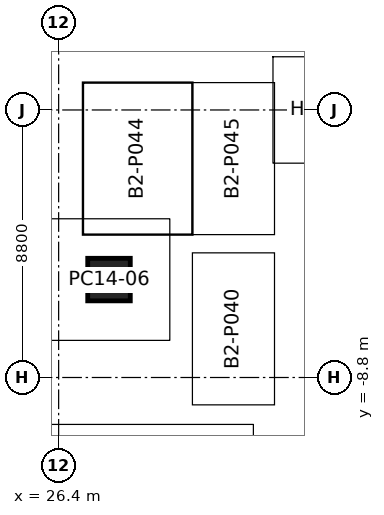
"""IFC4 building model, lengths in metres.
Left out: names, types, materials, properties, quantities, classifications, styles, units other than length and angle.
Written with IfcOpenShell. Run it as: python <this file> out.ifc"""

import sys

from ifc_helpers import new_model, si_unit, direction, frame, origin, origin_2d, place, context, subcontext, project, spatial, rectangle, extrude, element, save


model = new_model("IFC4")
c1 = context("Model", 3, precision=1e-05, world=origin(), true_north=direction((0.0, 1.0)))
c2 = subcontext(c1, "Body", "Model", "MODEL_VIEW")
j1 = project(units=[si_unit("LENGTHUNIT", "METRE"), si_unit("PLANEANGLEUNIT", "RADIAN")], contexts=[c1])
p1 = place(None, origin())
s1 = spatial("IfcSite", under=j1, at=p1, CompositionType="ELEMENT")
p2 = place(p1, origin())
s2 = spatial("IfcBuilding", under=s1, at=p2, CompositionType="ELEMENT")
p3 = place(p2, frame((0.0, 0.0, -9.0)))
s3 = spatial("IfcBuildingStorey", under=s2, at=p3, CompositionType="ELEMENT", Elevation=-9.0)
p4 = place(p3, frame((28.057, -5.579, 0.0), z_axis=(0.0, 0.0, 1.0), x_axis=(-0.382135123868, 0.924106458752, 0.0)))
e1 = element("IfcColumn", 1, at=p4, inside=s3, PredefinedType="COLUMN", context=c2, shape_type="SweptSolid", body=[
    extrude(rectangle(XDim=1.4, YDim=1.4, at=origin_2d()), origin(), (0.0, 0.0, 1.0), 4.5),
])
save(model, sys.argv[1])
